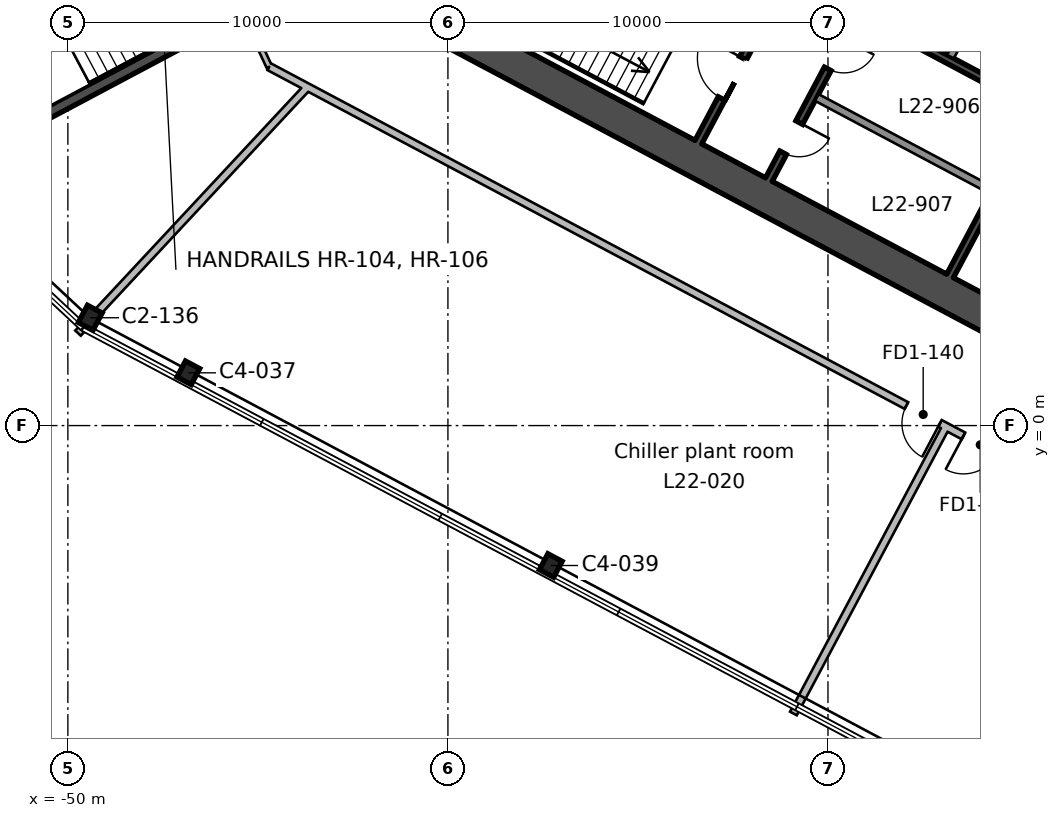
"""IFC4 building model, lengths in metres.
Left out: names, types, materials, properties, quantities, classifications, styles, units other than length and angle.
Written with IfcOpenShell. Run it as: python <this file> out.ifc"""

import sys

from ifc_helpers import new_model, si_unit, direction, frame, frame_2d, origin, origin_2d, place, context, subcontext, project, spatial, rectangle, i_section, extrude, element, fill, save


model = new_model("IFC4")
c1 = context("Model", 3, precision=1e-05, world=origin(), true_north=direction((0.0, 1.0)))
c2 = subcontext(c1, "Body", "Model", "MODEL_VIEW")
j1 = project(units=[si_unit("LENGTHUNIT", "METRE"), si_unit("PLANEANGLEUNIT", "RADIAN")], contexts=[c1])
p1 = place(None, origin())
s1 = spatial("IfcSite", under=j1, at=p1, CompositionType="ELEMENT")
p2 = place(p1, origin())
s2 = spatial("IfcBuilding", under=s1, at=p2, CompositionType="ELEMENT")
p3 = place(p2, frame((0.0, 0.0, 112.2)))
s3 = spatial("IfcBuildingStorey", under=s2, at=p3, CompositionType="ELEMENT", Elevation=112.2)
for number, where, z_axis, x_axis in (
    (1, (-37.294, -3.682, 0.0), (0.0, 0.0, 1.0), (0.883, -0.469, 0.0)),
    (2, (-46.83, 1.388, 0.0), (0.0, 0.0, 1.0), (0.883, -0.469, 0.0)),
):
    element("IfcColumn", number, at=place(p3, frame(where, z_axis=z_axis, x_axis=x_axis)), inside=s3, PredefinedType="COLUMN", context=c2, shape_type="SweptSolid", body=[
        extrude(i_section(OverallWidth=0.424, OverallDepth=0.475, WebThickness=0.048, FlangeThickness=0.077, FilletRadius=0.015, at=origin_2d()), origin(), (0.0, 0.0, 1.0), 6.0),
    ])
p4 = place(p3, frame((-49.412, 2.837, 0.0), z_axis=(0.0, 0.0, 1.0), x_axis=(0.882947592859, -0.469471562786, 0.0)))
e3 = element("IfcColumn", 3, at=p4, inside=s3, PredefinedType="COLUMN", context=c2, shape_type="SweptSolid", body=[
    extrude(i_section(OverallWidth=0.437, OverallDepth=0.513, WebThickness=0.061, FlangeThickness=0.097, FilletRadius=0.015, at=origin_2d()), origin(), (0.0, 0.0, 1.0), 6.0),
])
p5 = place(p3, frame((-22.937, 1.38, 0.0), z_axis=(0.0, 0.0, 1.0), x_axis=(-0.88295276571, 0.46946183394, 0.0)))
e4 = element("IfcWall", 4, at=p5, inside=s3, PredefinedType="SHEAR", context=c2, shape_type="SweptSolid", body=[
    extrude(rectangle(XDim=20.2, YDim=0.9, at=frame_2d((10.1, 0.0))), origin(), (0.0, 0.0, 1.0), 6.0),
])
p6 = place(p3, frame((-23.36, 10.382, 0.0), z_axis=(0.0, 0.0, 1.0), x_axis=(-0.469480409012, -0.88294288918, 0.0)))
e5 = element("IfcWall", 5, at=p6, inside=s3, PredefinedType="SHEAR", context=c2, shape_type="SweptSolid", body=[
    extrude(rectangle(XDim=7.3, YDim=0.2, at=frame_2d((3.65, 0.0))), origin(), (0.0, 0.0, 1.0), 6.0),
])
p7 = place(p3, frame((-25.744, 11.65, 0.0), z_axis=(0.0, 0.0, 1.0), x_axis=(-0.469487830541, -0.882938942948, 0.0)))
e6 = element("IfcWall", 6, at=p7, inside=s3, PredefinedType="SOLIDWALL", context=c2, shape_type="SweptSolid", body=[
    extrude(rectangle(XDim=2.2, YDim=0.2, at=frame_2d((1.1, 0.0))), origin(), (0.0, 0.0, 1.0), 6.0),
])
p8 = place(p3, frame((-28.128, 12.917, 0.0), z_axis=(0.0, 0.0, 1.0), x_axis=(-0.469454336211, -0.882956752176, 0.0)))
e7 = element("IfcWall", 7, at=p8, inside=s3, PredefinedType="SHEAR", context=c2, shape_type="SweptSolid", body=[
    extrude(rectangle(XDim=7.3, YDim=0.2, at=frame_2d((3.65, 0.0))), origin(), (0.0, 0.0, 1.0), 6.0),
])
p9 = place(p8, frame((3.1, 0.0, 0.0)))
e8 = element("IfcOpeningElement", 8, at=p9, cuts=e7, PredefinedType="OPENING", context=c2, shape_type="SweptSolid", body=[
    extrude(rectangle(XDim=0.9, YDim=2.1, at=frame_2d((0.45, 1.05))), frame((0.0, 0.11, 0.0), z_axis=(0.0, -1.0, 0.0), x_axis=(1.0, 0.0, 0.0)), (0.0, 0.0, 1.0), 0.22),
])
p10 = place(p8, frame((5.6, 0.0, 0.0)))
e9 = element("IfcOpeningElement", 9, at=p10, cuts=e7, PredefinedType="OPENING", context=c2, shape_type="SweptSolid", body=[
    extrude(rectangle(XDim=0.9, YDim=2.1, at=frame_2d((0.45, 1.05))), frame((0.0, 0.11, 0.0), z_axis=(0.0, -1.0, 0.0), x_axis=(1.0, 0.0, 0.0)), (0.0, 0.0, 1.0), 0.22),
])
p11 = place(p3, frame((-29.982, 13.903, 0.0), z_axis=(0.0, 0.0, 1.0), x_axis=(-0.469454336211, -0.882956752176, 0.0)))
e10 = element("IfcWall", 10, at=p11, inside=s3, PredefinedType="SHEAR", context=c2, shape_type="SweptSolid", body=[
    extrude(rectangle(XDim=7.3, YDim=0.2, at=frame_2d((3.65, 0.0))), origin(), (0.0, 0.0, 1.0), 6.0),
])
p12 = place(p11, frame((4.8, 0.0, 0.0)))
e11 = element("IfcOpeningElement", 11, at=p12, cuts=e10, PredefinedType="OPENING", context=c2, shape_type="SweptSolid", body=[
    extrude(rectangle(XDim=1.2, YDim=2.1, at=frame_2d((0.6, 1.05))), frame((0.0, 0.11, 0.0), z_axis=(0.0, -1.0, 0.0), x_axis=(1.0, 0.0, 0.0)), (0.0, 0.0, 1.0), 0.22),
])
p13 = place(p3, frame((-19.252, 8.311, 0.0), z_axis=(0.0, 0.0, 1.0), x_axis=(-0.882955722218, 0.469456273365, 0.0)))
e12 = element("IfcWall", 12, at=p13, inside=s3, PredefinedType="SHEAR", context=c2, shape_type="SweptSolid", body=[
    extrude(rectangle(XDim=10.0, YDim=0.2, at=frame_2d((5.0, 0.0))), origin(), (0.0, 0.0, 1.0), 6.0),
])
p14 = place(p13, frame((2.1, 0.0, 0.0)))
e13 = element("IfcOpeningElement", 13, at=p14, cuts=e12, PredefinedType="OPENING", context=c2, shape_type="SweptSolid", body=[
    extrude(rectangle(XDim=1.2, YDim=2.1, at=frame_2d((0.6, 1.05))), frame((0.0, 0.11, 0.0), z_axis=(0.0, -1.0, 0.0), x_axis=(1.0, 0.0, 0.0)), (0.0, 0.0, 1.0), 0.22),
])
p15 = place(p3, frame((-24.528, 8.398, 0.0), z_axis=(0.0, 0.0, 1.0), x_axis=(-0.882953967957, 0.469459572775, 0.0)))
e14 = element("IfcWall", 14, at=p15, inside=s3, PredefinedType="SHEAR", context=c2, shape_type="SweptSolid", body=[
    extrude(rectangle(XDim=5.2, YDim=0.2, at=frame_2d((2.6, 0.0))), origin(), (0.0, 0.0, 1.0), 6.0),
])
p16 = place(p3, frame((-25.702, 6.191, 0.0), z_axis=(0.0, 0.0, 1.0), x_axis=(-0.882934506056, 0.469496174655, 0.0)))
e15 = element("IfcWall", 15, at=p16, inside=s3, PredefinedType="SOLIDWALL", context=c2, shape_type="SweptSolid", body=[
    extrude(rectangle(XDim=5.2, YDim=0.2, at=frame_2d((2.6, 0.0))), origin(), (0.0, 0.0, 1.0), 6.0),
])
p17 = place(p3, frame((-45.297, 11.007, 0.0), z_axis=(0.0, 0.0, 1.0), x_axis=(-0.882951519127, -0.469464178475, 0.0)))
e16 = element("IfcWall", 16, at=p17, inside=s3, PredefinedType="SHEAR", context=c2, shape_type="SweptSolid", body=[
    extrude(rectangle(XDim=8.3, YDim=0.3, at=frame_2d((4.15, 0.0))), origin(), (0.0, 0.0, 1.0), 6.0),
])
p18 = place(p3, frame((-49.733, 2.433, 0.0), z_axis=(0.0, 0.0, 1.0), x_axis=(0.681990946379, 0.73136061492, 0.0)))
e17 = element("IfcWall", 17, at=p18, inside=s3, PredefinedType="PARTITIONING", context=c2, shape_type="SweptSolid", body=[
    extrude(rectangle(XDim=8.852, YDim=0.2, at=frame_2d((4.426, 0.0))), origin(), (0.0, 0.0, 1.0), 5.55),
])
p19 = place(p3, frame((-26.894, -0.027, 0.0), z_axis=(0.0, 0.0, 1.0), x_axis=(-0.469572720633, -0.882893798844, 0.0)))
e18 = element("IfcWall", 18, at=p19, inside=s3, PredefinedType="PARTITIONING", context=c2, shape_type="SweptSolid", body=[
    extrude(rectangle(XDim=8.55, YDim=0.2, at=frame_2d((4.275, 0.0))), origin(), (0.0, 0.0, 1.0), 5.55),
])
p20 = place(p3, frame((-8.114, -10.013, 0.0), z_axis=(0.0, 0.0, 1.0), x_axis=(-0.882945090575, 0.469476268866, 0.0)))
e19 = element("IfcWall", 19, at=p20, inside=s3, PredefinedType="PARTITIONING", context=c2, shape_type="SweptSolid", body=[
    extrude(rectangle(XDim=41.437, YDim=0.2, at=frame_2d((20.719, 0.0))), origin(), (0.0, 0.0, 1.0), 5.55),
])
p21 = place(p20, frame((21.45, 0.0, 0.0)))
e20 = element("IfcOpeningElement", 20, at=p21, cuts=e19, PredefinedType="OPENING", context=c2, shape_type="SweptSolid", body=[
    extrude(rectangle(XDim=1.0, YDim=2.1, at=frame_2d((0.5, 1.05))), frame((0.0, 0.11, 0.0), z_axis=(0.0, -1.0, 0.0), x_axis=(1.0, 0.0, 0.0)), (0.0, 0.0, 1.0), 0.22),
])
p22 = place(p20, frame((19.75, 0.0, 0.0)))
e21 = element("IfcOpeningElement", 21, at=p22, cuts=e19, PredefinedType="OPENING", context=c2, shape_type="SweptSolid", body=[
    extrude(rectangle(XDim=1.0, YDim=2.1, at=frame_2d((0.5, 1.05))), frame((0.0, 0.11, 0.0), z_axis=(0.0, -1.0, 0.0), x_axis=(1.0, 0.0, 0.0)), (0.0, 0.0, 1.0), 0.22),
])
p23 = place(p3, frame((-44.701, 9.441, 0.0), z_axis=(0.0, 0.0, 1.0), x_axis=(-0.421636193094, 0.906765085716, 0.0)))
e22 = element("IfcWall", 22, at=p23, inside=s3, PredefinedType="PARTITIONING", context=c2, shape_type="SweptSolid", body=[
    extrude(rectangle(XDim=1.53, YDim=0.15, at=frame_2d((0.765, 0.0))), origin(), (0.0, 0.0, 1.0), 5.55),
])
p24 = place(p12, frame((1.2, 0.0, 0.0), z_axis=(0.0, 0.0, 1.0), x_axis=(-1.0, 0.0, 0.0)))
e23 = element("IfcDoor", 23, at=p24, inside=s3, OperationType="SINGLE_SWING_RIGHT", PredefinedType="DOOR", context=c2, shape_type="SweptSolid", body=[
    extrude(rectangle(XDim=1.2, YDim=2.1, at=frame_2d((0.6, 1.05))), frame((0.0, 0.025, 0.0), z_axis=(0.0, -1.0, 0.0), x_axis=(1.0, 0.0, 0.0)), (0.0, 0.0, 1.0), 0.05),
])
fill(e11, e23)
p25 = place(p9, origin())
e24 = element("IfcDoor", 24, at=p25, inside=s3, OperationType="SINGLE_SWING_LEFT", PredefinedType="DOOR", context=c2, shape_type="SweptSolid", body=[
    extrude(rectangle(XDim=0.9, YDim=2.1, at=frame_2d((0.45, 1.05))), frame((0.0, 0.025, 0.0), z_axis=(0.0, -1.0, 0.0), x_axis=(1.0, 0.0, 0.0)), (0.0, 0.0, 1.0), 0.05),
])
fill(e8, e24)
p26 = place(p10, origin())
e25 = element("IfcDoor", 25, at=p26, inside=s3, OperationType="SINGLE_SWING_LEFT", PredefinedType="DOOR", context=c2, shape_type="SweptSolid", body=[
    extrude(rectangle(XDim=0.9, YDim=2.1, at=frame_2d((0.45, 1.05))), frame((0.0, 0.025, 0.0), z_axis=(0.0, -1.0, 0.0), x_axis=(1.0, 0.0, 0.0)), (0.0, 0.0, 1.0), 0.05),
])
fill(e9, e25)
p27 = place(p21, origin())
e26 = element("IfcDoor", 26, at=p27, inside=s3, OperationType="SINGLE_SWING_LEFT", PredefinedType="DOOR", context=c2, shape_type="SweptSolid", body=[
    extrude(rectangle(XDim=1.0, YDim=2.1, at=frame_2d((0.5, 1.05))), frame((0.0, 0.025, 0.0), z_axis=(0.0, -1.0, 0.0), x_axis=(1.0, 0.0, 0.0)), (0.0, 0.0, 1.0), 0.05),
])
fill(e20, e26)
p28 = place(p22, origin())
e27 = element("IfcDoor", 27, at=p28, inside=s3, OperationType="SINGLE_SWING_RIGHT", PredefinedType="DOOR", context=c2, shape_type="SweptSolid", body=[
    extrude(rectangle(XDim=1.0, YDim=2.1, at=frame_2d((0.5, 1.05))), frame((0.0, 0.025, 0.0), z_axis=(0.0, -1.0, 0.0), x_axis=(1.0, 0.0, 0.0)), (0.0, 0.0, 1.0), 0.05),
])
fill(e21, e27)
save(model, sys.argv[1])
